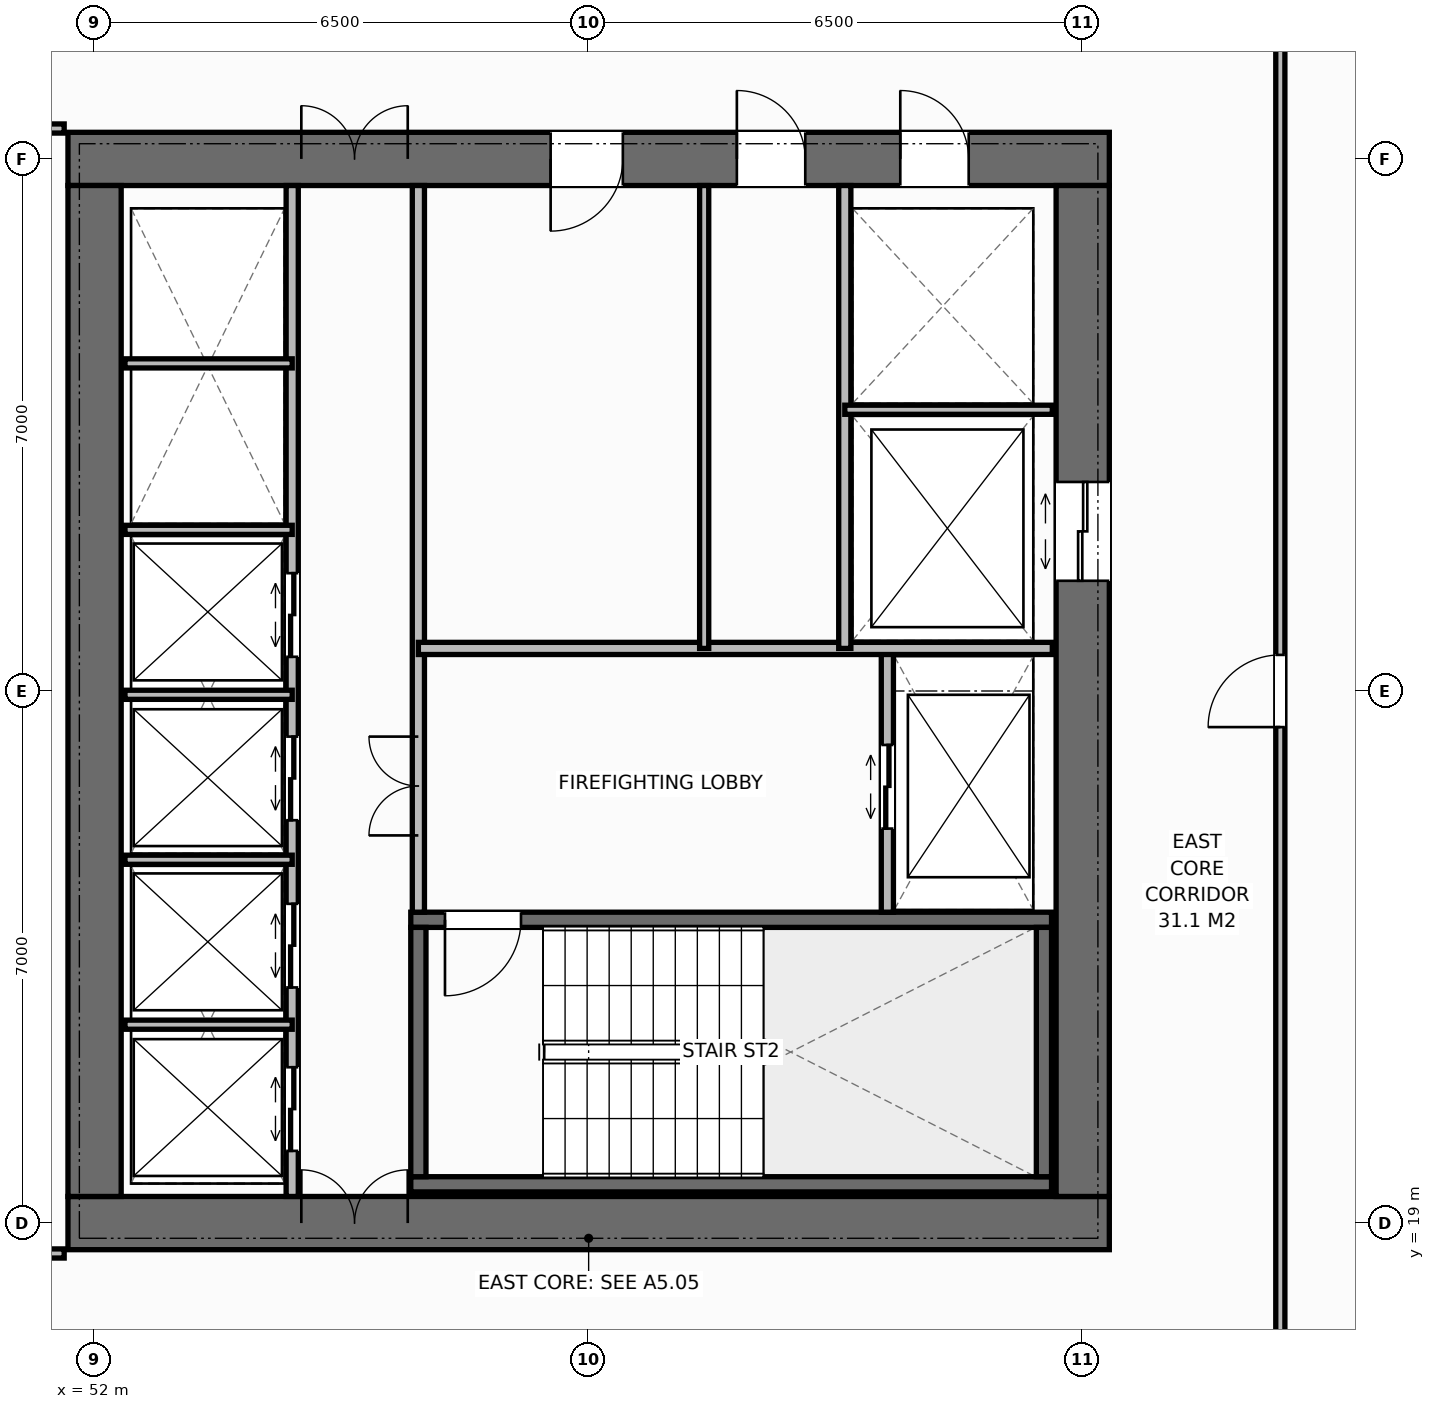
"""IFC4 building model, lengths in metres.
Left out: names, types, materials, properties, quantities, classifications, styles, units other than length and angle.
Written with IfcOpenShell. Run it as: python <this file> out.ifc"""

import sys

from ifc_helpers import new_model, si_unit, direction, frame, frame_2d, origin, place, context, subcontext, project, spatial, rectangle, extrude, element, fill, save


model = new_model("IFC4")
c1 = context("Model", 3, precision=1e-05, world=origin(), true_north=direction((0.0, 1.0)))
c2 = subcontext(c1, "Body", "Model", "MODEL_VIEW")
j1 = project(units=[si_unit("LENGTHUNIT", "METRE"), si_unit("PLANEANGLEUNIT", "RADIAN")], contexts=[c1])
p1 = place(None, origin())
s1 = spatial("IfcSite", under=j1, at=p1, CompositionType="ELEMENT")
p2 = place(p1, origin())
s2 = spatial("IfcBuilding", under=s1, at=p2, CompositionType="ELEMENT")
p3 = place(p2, frame((0.0, 0.0, 86.0)))
s3 = spatial("IfcBuildingStorey", under=s2, at=p3, CompositionType="ELEMENT", Elevation=86.0)
p4 = place(p3, frame((51.65, 19.0, 0.0), z_axis=(0.0, 0.0, 1.0), x_axis=(1.0, 0.0, 0.0)))
e1 = element("IfcWall", 1, at=p4, inside=s3, PredefinedType="SHEAR", context=c2, shape_type="SweptSolid", body=[
    extrude(rectangle(XDim=13.7, YDim=0.7, at=frame_2d((6.85, 0.0))), origin(), (0.0, 0.0, 1.0), 3.8),
])
p5 = place(p4, frame((3.07, 0.0, 0.0)))
e2 = element("IfcOpeningElement", 2, at=p5, cuts=e1, PredefinedType="OPENING", context=c2, shape_type="SweptSolid", body=[
    extrude(rectangle(XDim=1.4, YDim=2.2, at=frame_2d((0.7, 1.1))), frame((0.0, 0.36, 0.0), z_axis=(0.0, -1.0, 0.0), x_axis=(1.0, 0.0, 0.0)), (0.0, 0.0, 1.0), 0.72),
])
p6 = place(p3, frame((51.65, 33.0, 0.0), z_axis=(0.0, 0.0, 1.0), x_axis=(1.0, 0.0, 0.0)))
e3 = element("IfcWall", 3, at=p6, inside=s3, PredefinedType="SHEAR", context=c2, shape_type="SweptSolid", body=[
    extrude(rectangle(XDim=13.7, YDim=0.7, at=frame_2d((6.85, 0.0))), origin(), (0.0, 0.0, 1.0), 3.8),
])
p7 = place(p6, frame((3.07, 0.0, 0.0)))
e4 = element("IfcOpeningElement", 4, at=p7, cuts=e3, PredefinedType="OPENING", context=c2, shape_type="SweptSolid", body=[
    extrude(rectangle(XDim=1.4, YDim=2.2, at=frame_2d((0.7, 1.1))), frame((0.0, 0.36, 0.0), z_axis=(0.0, -1.0, 0.0), x_axis=(1.0, 0.0, 0.0)), (0.0, 0.0, 1.0), 0.72),
])
p8 = place(p6, frame((10.95, 0.0, 0.0)))
e5 = element("IfcOpeningElement", 5, at=p8, cuts=e3, PredefinedType="OPENING", context=c2, shape_type="SweptSolid", body=[
    extrude(rectangle(XDim=0.9, YDim=2.15, at=frame_2d((0.45, 1.075))), frame((0.0, 0.36, 0.0), z_axis=(0.0, -1.0, 0.0), x_axis=(1.0, 0.0, 0.0)), (0.0, 0.0, 1.0), 0.72),
])
p9 = place(p6, frame((6.35, 0.0, 0.0)))
e6 = element("IfcOpeningElement", 6, at=p9, cuts=e3, PredefinedType="OPENING", context=c2, shape_type="SweptSolid", body=[
    extrude(rectangle(XDim=0.95, YDim=2.15, at=frame_2d((0.475, 1.075))), frame((0.0, 0.36, 0.0), z_axis=(0.0, -1.0, 0.0), x_axis=(1.0, 0.0, 0.0)), (0.0, 0.0, 1.0), 0.72),
])
p10 = place(p6, frame((8.8, 0.0, 0.0)))
e7 = element("IfcOpeningElement", 7, at=p10, cuts=e3, PredefinedType="OPENING", context=c2, shape_type="SweptSolid", body=[
    extrude(rectangle(XDim=0.9, YDim=2.15, at=frame_2d((0.45, 1.075))), frame((0.0, 0.36, 0.0), z_axis=(0.0, -1.0, 0.0), x_axis=(1.0, 0.0, 0.0)), (0.0, 0.0, 1.0), 0.72),
])
p11 = place(p3, frame((52.0, 19.35, 0.0), z_axis=(0.0, 0.0, 1.0), x_axis=(0.0, 1.0, 0.0)))
e8 = element("IfcWall", 8, at=p11, inside=s3, PredefinedType="SHEAR", context=c2, shape_type="SweptSolid", body=[
    extrude(rectangle(XDim=13.3, YDim=0.7, at=frame_2d((6.65, 0.0))), origin(), (0.0, 0.0, 1.0), 3.8),
])
p12 = place(p3, frame((65.0, 19.35, 0.0), z_axis=(0.0, 0.0, 1.0), x_axis=(0.0, 1.0, 0.0)))
e9 = element("IfcWall", 9, at=p12, inside=s3, PredefinedType="SHEAR", context=c2, shape_type="SweptSolid", body=[
    extrude(rectangle(XDim=13.3, YDim=0.7, at=frame_2d((6.65, 0.0))), origin(), (0.0, 0.0, 1.0), 3.8),
])
p13 = place(p12, frame((8.1, 0.0, 0.0)))
e10 = element("IfcOpeningElement", 10, at=p13, cuts=e9, PredefinedType="OPENING", context=c2, shape_type="SweptSolid", body=[
    extrude(rectangle(XDim=1.3, YDim=2.2, at=frame_2d((0.65, 1.1))), frame((0.0, 0.36, 0.0), z_axis=(0.0, -1.0, 0.0), x_axis=(1.0, 0.0, 0.0)), (0.0, 0.0, 1.0), 0.72),
])
p14 = place(p3, frame((56.16, 19.51, 0.0), z_axis=(0.0, 0.0, 1.0), x_axis=(1.0, 0.0, 0.0)))
e11 = element("IfcWall", 11, at=p14, inside=s3, PredefinedType="SHEAR", context=c2, shape_type="SweptSolid", body=[
    extrude(rectangle(XDim=8.43, YDim=0.2, at=frame_2d((4.215, 0.0))), origin(), (0.0, 0.0, 1.0), 3.8),
])
p15 = place(p3, frame((56.16, 22.99, 0.0), z_axis=(0.0, 0.0, 1.0), x_axis=(1.0, 0.0, 0.0)))
e12 = element("IfcWall", 12, at=p15, inside=s3, PredefinedType="SHEAR", context=c2, shape_type="SweptSolid", body=[
    extrude(rectangle(XDim=8.43, YDim=0.2, at=frame_2d((4.215, 0.0))), origin(), (0.0, 0.0, 1.0), 3.8),
])
p16 = place(p15, frame((0.45, 0.0, 0.0)))
e13 = element("IfcOpeningElement", 13, at=p16, cuts=e12, PredefinedType="OPENING", context=c2, shape_type="SweptSolid", body=[
    extrude(rectangle(XDim=1.0, YDim=2.15, at=frame_2d((0.5, 1.075))), frame((0.0, 0.11, 0.0), z_axis=(0.0, -1.0, 0.0), x_axis=(1.0, 0.0, 0.0)), (0.0, 0.0, 1.0), 0.22),
])
for number, where, z_axis, x_axis in (
    (14, (56.26, 19.61, 0.0), (0.0, 0.0, 1.0), (0.0, 1.0, 0.0)),
    (15, (64.49, 19.61, 0.0), (0.0, 0.0, 1.0), (0.0, 1.0, 0.0)),
):
    element("IfcWall", number, at=place(p3, frame(where, z_axis=z_axis, x_axis=x_axis)), inside=s3, PredefinedType="SHEAR", context=c2, shape_type="SweptSolid", body=[
        extrude(rectangle(XDim=3.28, YDim=0.2, at=frame_2d((1.64, 0.0))), origin(), (0.0, 0.0, 1.0), 3.8),
    ])
p17 = place(p3, frame((54.6, 19.35, 0.0), z_axis=(0.0, 0.0, 1.0), x_axis=(0.0, 1.0, 0.0)))
e16 = element("IfcWall", 16, at=p17, inside=s3, PredefinedType="STANDARD", context=c2, shape_type="SweptSolid", body=[
    extrude(rectangle(XDim=13.3, YDim=0.16, at=frame_2d((6.65, 0.0))), origin(), (0.0, 0.0, 1.0), 3.565),
])
p18 = place(p17, frame((0.6, 0.0, 0.0)))
e17 = element("IfcOpeningElement", 17, at=p18, cuts=e16, PredefinedType="OPENING", context=c2, shape_type="SweptSolid", body=[
    extrude(rectangle(XDim=1.1, YDim=2.2, at=frame_2d((0.55, 1.1))), frame((0.0, 0.09, 0.0), z_axis=(0.0, -1.0, 0.0), x_axis=(1.0, 0.0, 0.0)), (0.0, 0.0, 1.0), 0.18),
])
p19 = place(p17, frame((2.75, 0.0, 0.0)))
e18 = element("IfcOpeningElement", 18, at=p19, cuts=e16, PredefinedType="OPENING", context=c2, shape_type="SweptSolid", body=[
    extrude(rectangle(XDim=1.1, YDim=2.2, at=frame_2d((0.55, 1.1))), frame((0.0, 0.09, 0.0), z_axis=(0.0, -1.0, 0.0), x_axis=(1.0, 0.0, 0.0)), (0.0, 0.0, 1.0), 0.18),
])
p20 = place(p17, frame((4.95, 0.0, 0.0)))
e19 = element("IfcOpeningElement", 19, at=p20, cuts=e16, PredefinedType="OPENING", context=c2, shape_type="SweptSolid", body=[
    extrude(rectangle(XDim=1.1, YDim=2.2, at=frame_2d((0.55, 1.1))), frame((0.0, 0.09, 0.0), z_axis=(0.0, -1.0, 0.0), x_axis=(1.0, 0.0, 0.0)), (0.0, 0.0, 1.0), 0.18),
])
p21 = place(p17, frame((7.1, 0.0, 0.0)))
e20 = element("IfcOpeningElement", 20, at=p21, cuts=e16, PredefinedType="OPENING", context=c2, shape_type="SweptSolid", body=[
    extrude(rectangle(XDim=1.1, YDim=2.2, at=frame_2d((0.55, 1.1))), frame((0.0, 0.09, 0.0), z_axis=(0.0, -1.0, 0.0), x_axis=(1.0, 0.0, 0.0)), (0.0, 0.0, 1.0), 0.18),
])
p22 = place(p3, frame((56.26, 23.09, 0.0), z_axis=(0.0, 0.0, 1.0), x_axis=(0.0, 1.0, 0.0)))
e21 = element("IfcWall", 21, at=p22, inside=s3, PredefinedType="STANDARD", context=c2, shape_type="SweptSolid", body=[
    extrude(rectangle(XDim=9.56, YDim=0.16, at=frame_2d((4.78, 0.0))), origin(), (0.0, 0.0, 1.0), 3.565),
])
p23 = place(p22, frame((1.01, 0.0, 0.0)))
e22 = element("IfcOpeningElement", 22, at=p23, cuts=e21, PredefinedType="OPENING", context=c2, shape_type="SweptSolid", body=[
    extrude(rectangle(XDim=1.3, YDim=2.2, at=frame_2d((0.65, 1.1))), frame((0.0, 0.09, 0.0), z_axis=(0.0, -1.0, 0.0), x_axis=(1.0, 0.0, 0.0)), (0.0, 0.0, 1.0), 0.18),
])
for number, where, z_axis, x_axis in (
    (23, (52.4, 21.61, 0.0), (0.0, 0.0, 1.0), (1.0, 0.0, 0.0)),
    (24, (52.4, 23.78, 0.0), (0.0, 0.0, 1.0), (1.0, 0.0, 0.0)),
    (25, (52.4, 25.95, 0.0), (0.0, 0.0, 1.0), (1.0, 0.0, 0.0)),
    (26, (52.4, 28.12, 0.0), (0.0, 0.0, 1.0), (1.0, 0.0, 0.0)),
    (27, (52.4, 30.31, 0.0), (0.0, 0.0, 1.0), (1.0, 0.0, 0.0)),
):
    element("IfcWall", number, at=place(p3, frame(where, z_axis=z_axis, x_axis=x_axis)), inside=s3, PredefinedType="PARTITIONING", context=c2, shape_type="SweptSolid", body=[
        extrude(rectangle(XDim=2.2, YDim=0.12, at=frame_2d((1.1, 0.0))), origin(), (0.0, 0.0, 1.0), 3.565),
    ])
p24 = place(p3, frame((62.43, 23.09, 0.0), z_axis=(0.0, 0.0, 1.0), x_axis=(0.0, 1.0, 0.0)))
e28 = element("IfcWall", 28, at=p24, inside=s3, PredefinedType="STANDARD", context=c2, shape_type="SweptSolid", body=[
    extrude(rectangle(XDim=3.47, YDim=0.16, at=frame_2d((1.735, 0.0))), origin(), (0.0, 0.0, 1.0), 3.565),
])
p25 = place(p24, frame((1.1, 0.0, 0.0)))
e29 = element("IfcOpeningElement", 29, at=p25, cuts=e28, PredefinedType="OPENING", context=c2, shape_type="SweptSolid", body=[
    extrude(rectangle(XDim=1.1, YDim=2.2, at=frame_2d((0.55, 1.1))), frame((0.0, 0.09, 0.0), z_axis=(0.0, -1.0, 0.0), x_axis=(1.0, 0.0, 0.0)), (0.0, 0.0, 1.0), 0.18),
])
p26 = place(p3, frame((56.26, 26.56, 0.0), z_axis=(0.0, 0.0, 1.0), x_axis=(1.0, 0.0, 0.0)))
e30 = element("IfcWall", 30, at=p26, inside=s3, PredefinedType="STANDARD", context=c2, shape_type="SweptSolid", body=[
    extrude(rectangle(XDim=8.34, YDim=0.16, at=frame_2d((4.17, 0.0))), origin(), (0.0, 0.0, 1.0), 3.565),
])
p27 = place(p3, frame((61.87, 26.56, 0.0), z_axis=(0.0, 0.0, 1.0), x_axis=(0.0, 1.0, 0.0)))
e31 = element("IfcWall", 31, at=p27, inside=s3, PredefinedType="STANDARD", context=c2, shape_type="SweptSolid", body=[
    extrude(rectangle(XDim=6.09, YDim=0.16, at=frame_2d((3.045, 0.0))), origin(), (0.0, 0.0, 1.0), 3.565),
])
p28 = place(p3, frame((61.87, 29.7, 0.0), z_axis=(0.0, 0.0, 1.0), x_axis=(1.0, 0.0, 0.0)))
e32 = element("IfcWall", 32, at=p28, inside=s3, PredefinedType="PARTITIONING", context=c2, shape_type="SweptSolid", body=[
    extrude(rectangle(XDim=2.73, YDim=0.12, at=frame_2d((1.365, 0.0))), origin(), (0.0, 0.0, 1.0), 3.565),
])
p29 = place(p3, frame((60.02, 26.56, 0.0), z_axis=(0.0, 0.0, 1.0), x_axis=(0.0, 1.0, 0.0)))
e33 = element("IfcWall", 33, at=p29, inside=s3, PredefinedType="PARTITIONING", context=c2, shape_type="SweptSolid", body=[
    extrude(rectangle(XDim=6.09, YDim=0.12, at=frame_2d((3.045, 0.0))), origin(), (0.0, 0.0, 1.0), 3.565),
])
p30 = place(p3, frame((48.0, 33.4, 0.0), z_axis=(0.0, 0.0, 1.0), x_axis=(1.0, 0.0, 0.0)))
e34 = element("IfcWall", 34, at=p30, inside=s3, PredefinedType="PARTITIONING", context=c2, shape_type="SweptSolid", body=[
    extrude(rectangle(XDim=3.6, YDim=0.12, at=frame_2d((1.8, 0.0))), origin(), (0.0, 0.0, 1.0), 3.565),
])
p31 = place(p3, frame((48.0, 18.6, 0.0), z_axis=(0.0, 0.0, 1.0), x_axis=(1.0, 0.0, 0.0)))
e35 = element("IfcWall", 35, at=p31, inside=s3, PredefinedType="PARTITIONING", context=c2, shape_type="SweptSolid", body=[
    extrude(rectangle(XDim=3.6, YDim=0.12, at=frame_2d((1.8, 0.0))), origin(), (0.0, 0.0, 1.0), 3.565),
])
p32 = place(p31, frame((1.1, 0.0, 0.0)))
e36 = element("IfcOpeningElement", 36, at=p32, cuts=e35, PredefinedType="OPENING", context=c2, shape_type="SweptSolid", body=[
    extrude(rectangle(XDim=0.95, YDim=2.15, at=frame_2d((0.475, 1.075))), frame((0.0, 0.07, 0.0), z_axis=(0.0, -1.0, 0.0), x_axis=(1.0, 0.0, 0.0)), (0.0, 0.0, 1.0), 0.14),
])
p33 = place(p3, frame((67.6, 16.5, 0.0), z_axis=(0.0, 0.0, 1.0), x_axis=(0.0, 1.0, 0.0)))
e37 = element("IfcWall", 37, at=p33, inside=s3, PredefinedType="PARTITIONING", context=c2, shape_type="SweptSolid", body=[
    extrude(rectangle(XDim=19.0, YDim=0.12, at=frame_2d((9.5, 0.0))), origin(), (0.0, 0.0, 1.0), 3.565),
])
p34 = place(p33, frame((9.025, 0.0, 0.0)))
e38 = element("IfcOpeningElement", 38, at=p34, cuts=e37, PredefinedType="OPENING", context=c2, shape_type="SweptSolid", body=[
    extrude(rectangle(XDim=0.95, YDim=2.15, at=frame_2d((0.475, 1.075))), frame((0.0, 0.07, 0.0), z_axis=(0.0, -1.0, 0.0), x_axis=(1.0, 0.0, 0.0)), (0.0, 0.0, 1.0), 0.14),
])
p35 = place(p5, origin())
e39 = element("IfcDoor", 39, at=p35, inside=s3, OperationType="DOUBLE_DOOR_SINGLE_SWING", PredefinedType="DOOR", context=c2, shape_type="SweptSolid", body=[
    extrude(rectangle(XDim=1.4, YDim=2.2, at=frame_2d((0.7, 1.1))), frame((0.0, 0.125, 0.0), z_axis=(0.0, -1.0, 0.0), x_axis=(1.0, 0.0, 0.0)), (0.0, 0.0, 1.0), 0.05),
])
fill(e2, e39)
p36 = place(p7, origin())
e40 = element("IfcDoor", 40, at=p36, inside=s3, OperationType="DOUBLE_DOOR_SINGLE_SWING", PredefinedType="DOOR", context=c2, shape_type="SweptSolid", body=[
    extrude(rectangle(XDim=1.4, YDim=2.2, at=frame_2d((0.7, 1.1))), frame((0.0, -0.075, 0.0), z_axis=(0.0, -1.0, 0.0), x_axis=(1.0, 0.0, 0.0)), (0.0, 0.0, 1.0), 0.05),
])
fill(e4, e40)
p37 = place(p18, origin())
e41 = element("IfcDoor", 41, at=p37, inside=s3, OperationType="DOUBLE_DOOR_SLIDING", PredefinedType="DOOR", context=c2, shape_type="SweptSolid", body=[
    extrude(rectangle(XDim=1.1, YDim=2.2, at=frame_2d((0.55, 1.1))), frame((0.0, 0.025, 0.0), z_axis=(0.0, -1.0, 0.0), x_axis=(1.0, 0.0, 0.0)), (0.0, 0.0, 1.0), 0.05),
])
fill(e17, e41)
p38 = place(p19, origin())
e42 = element("IfcDoor", 42, at=p38, inside=s3, OperationType="DOUBLE_DOOR_SLIDING", PredefinedType="DOOR", context=c2, shape_type="SweptSolid", body=[
    extrude(rectangle(XDim=1.1, YDim=2.2, at=frame_2d((0.55, 1.1))), frame((0.0, 0.025, 0.0), z_axis=(0.0, -1.0, 0.0), x_axis=(1.0, 0.0, 0.0)), (0.0, 0.0, 1.0), 0.05),
])
fill(e18, e42)
p39 = place(p20, origin())
e43 = element("IfcDoor", 43, at=p39, inside=s3, OperationType="DOUBLE_DOOR_SLIDING", PredefinedType="DOOR", context=c2, shape_type="SweptSolid", body=[
    extrude(rectangle(XDim=1.1, YDim=2.2, at=frame_2d((0.55, 1.1))), frame((0.0, 0.025, 0.0), z_axis=(0.0, -1.0, 0.0), x_axis=(1.0, 0.0, 0.0)), (0.0, 0.0, 1.0), 0.05),
])
fill(e19, e43)
p40 = place(p21, origin())
e44 = element("IfcDoor", 44, at=p40, inside=s3, OperationType="DOUBLE_DOOR_SLIDING", PredefinedType="DOOR", context=c2, shape_type="SweptSolid", body=[
    extrude(rectangle(XDim=1.1, YDim=2.2, at=frame_2d((0.55, 1.1))), frame((0.0, 0.025, 0.0), z_axis=(0.0, -1.0, 0.0), x_axis=(1.0, 0.0, 0.0)), (0.0, 0.0, 1.0), 0.05),
])
fill(e20, e44)
p41 = place(p16, origin())
e45 = element("IfcDoor", 45, at=p41, inside=s3, OperationType="SINGLE_SWING_RIGHT", PredefinedType="DOOR", context=c2, shape_type="SweptSolid", body=[
    extrude(rectangle(XDim=1.0, YDim=2.15, at=frame_2d((0.5, 1.075))), frame((0.0, 0.025, 0.0), z_axis=(0.0, -1.0, 0.0), x_axis=(1.0, 0.0, 0.0)), (0.0, 0.0, 1.0), 0.05),
])
fill(e13, e45)
p42 = place(p25, origin())
e46 = element("IfcDoor", 46, at=p42, inside=s3, OperationType="DOUBLE_DOOR_SLIDING", PredefinedType="DOOR", context=c2, shape_type="SweptSolid", body=[
    extrude(rectangle(XDim=1.1, YDim=2.2, at=frame_2d((0.55, 1.1))), frame((0.0, 0.025, 0.0), z_axis=(0.0, -1.0, 0.0), x_axis=(1.0, 0.0, 0.0)), (0.0, 0.0, 1.0), 0.05),
])
fill(e29, e46)
p43 = place(p23, origin())
e47 = element("IfcDoor", 47, at=p43, inside=s3, OperationType="DOUBLE_DOOR_SINGLE_SWING", PredefinedType="DOOR", context=c2, shape_type="SweptSolid", body=[
    extrude(rectangle(XDim=1.3, YDim=2.2, at=frame_2d((0.65, 1.1))), frame((0.0, 0.025, 0.0), z_axis=(0.0, -1.0, 0.0), x_axis=(1.0, 0.0, 0.0)), (0.0, 0.0, 1.0), 0.05),
])
fill(e22, e47)
p44 = place(p13, origin())
e48 = element("IfcDoor", 48, at=p44, inside=s3, OperationType="DOUBLE_DOOR_SLIDING", PredefinedType="DOOR", context=c2, shape_type="SweptSolid", body=[
    extrude(rectangle(XDim=1.3, YDim=2.2, at=frame_2d((0.65, 1.1))), frame((0.0, 0.025, 0.0), z_axis=(0.0, -1.0, 0.0), x_axis=(1.0, 0.0, 0.0)), (0.0, 0.0, 1.0), 0.05),
])
fill(e10, e48)
p45 = place(p8, origin())
e49 = element("IfcDoor", 49, at=p45, inside=s3, OperationType="SINGLE_SWING_LEFT", PredefinedType="DOOR", context=c2, shape_type="SweptSolid", body=[
    extrude(rectangle(XDim=0.9, YDim=2.15, at=frame_2d((0.45, 1.075))), frame((0.0, -0.075, 0.0), z_axis=(0.0, -1.0, 0.0), x_axis=(1.0, 0.0, 0.0)), (0.0, 0.0, 1.0), 0.05),
])
fill(e5, e49)
p46 = place(p9, origin())
e50 = element("IfcDoor", 50, at=p46, inside=s3, OperationType="SINGLE_SWING_RIGHT", PredefinedType="DOOR", context=c2, shape_type="SweptSolid", body=[
    extrude(rectangle(XDim=0.95, YDim=2.15, at=frame_2d((0.475, 1.075))), frame((0.0, -0.075, 0.0), z_axis=(0.0, -1.0, 0.0), x_axis=(1.0, 0.0, 0.0)), (0.0, 0.0, 1.0), 0.05),
])
fill(e6, e50)
p47 = place(p10, origin())
e51 = element("IfcDoor", 51, at=p47, inside=s3, OperationType="SINGLE_SWING_LEFT", PredefinedType="DOOR", context=c2, shape_type="SweptSolid", body=[
    extrude(rectangle(XDim=0.9, YDim=2.15, at=frame_2d((0.45, 1.075))), frame((0.0, -0.075, 0.0), z_axis=(0.0, -1.0, 0.0), x_axis=(1.0, 0.0, 0.0)), (0.0, 0.0, 1.0), 0.05),
])
fill(e7, e51)
p48 = place(p34, origin())
e52 = element("IfcDoor", 52, at=p48, inside=s3, OperationType="SINGLE_SWING_LEFT", PredefinedType="DOOR", context=c2, shape_type="SweptSolid", body=[
    extrude(rectangle(XDim=0.95, YDim=2.15, at=frame_2d((0.475, 1.075))), frame((0.0, 0.025, 0.0), z_axis=(0.0, -1.0, 0.0), x_axis=(1.0, 0.0, 0.0)), (0.0, 0.0, 1.0), 0.05),
])
fill(e38, e52)
save(model, sys.argv[1])
